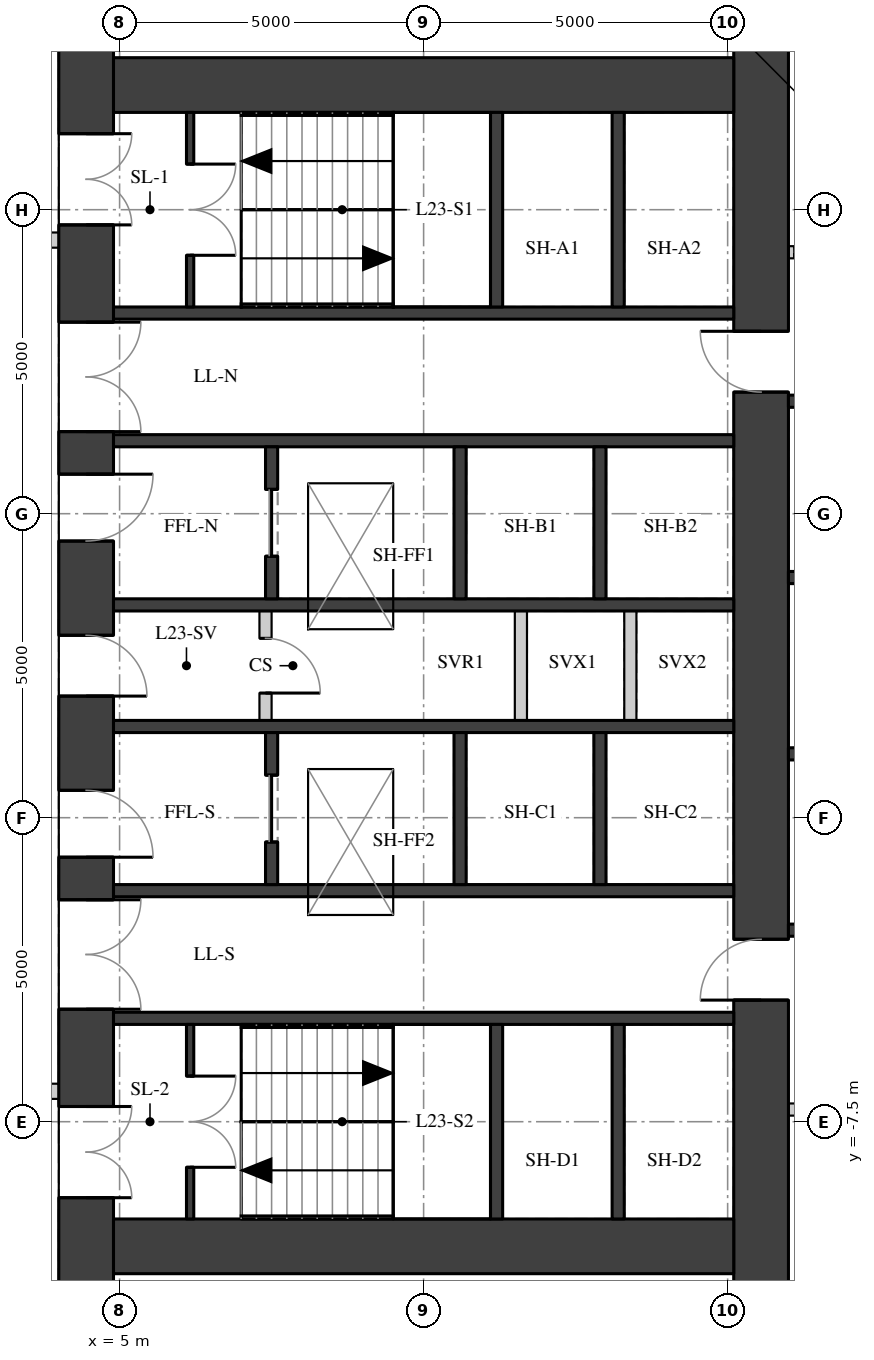
"""IFC4 building model, lengths in metres.
Left out: names, types, materials, properties, quantities, classifications, styles, units other than length and angle.
Written with IfcOpenShell. Run it as: python <this file> out.ifc"""

import sys

from ifc_helpers import new_model, si_unit, direction, frame, frame_2d, origin, place, context, subcontext, project, spatial, rectangle, extrude, element, fill, save


model = new_model("IFC4")
c1 = context("Model", 3, precision=1e-05, world=origin(), true_north=direction((0.0, 1.0)))
c2 = subcontext(c1, "Body", "Model", "MODEL_VIEW")
j1 = project(units=[si_unit("LENGTHUNIT", "METRE"), si_unit("PLANEANGLEUNIT", "RADIAN")], contexts=[c1])
p1 = place(None, origin())
s1 = spatial("IfcSite", under=j1, at=p1, CompositionType="ELEMENT")
p2 = place(p1, origin())
s2 = spatial("IfcBuilding", under=s1, at=p2, CompositionType="ELEMENT")
p3 = place(p2, frame((0.0, 0.0, 84.4)))
s3 = spatial("IfcBuildingStorey", under=s2, at=p3, CompositionType="ELEMENT", Elevation=84.4)
p4 = place(p3, frame((4.45, -11.1, 0.0), z_axis=(0.0, 0.0, 1.0), x_axis=(0.0, 1.0, 0.0)))
e1 = element("IfcWall", 1, at=p4, inside=s3, PredefinedType="SHEAR", context=c2, shape_type="SweptSolid", body=[
    extrude(rectangle(XDim=22.2, YDim=0.9, at=frame_2d((11.1, 0.0))), origin(), (0.0, 0.0, 1.0), 4.22),
])
p5 = place(p4, frame((2.35, 0.0, 0.0)))
e2 = element("IfcOpeningElement", 2, at=p5, cuts=e1, PredefinedType="OPENING", context=c2, shape_type="SweptSolid", body=[
    extrude(rectangle(XDim=1.5, YDim=2.1, at=frame_2d((0.75, 1.05))), frame((0.0, 0.46, 0.0), z_axis=(0.0, -1.0, 0.0), x_axis=(1.0, 0.0, 0.0)), (0.0, 0.0, 1.0), 0.92),
])
p6 = place(p4, frame((5.45, 0.0, 0.0)))
e3 = element("IfcOpeningElement", 3, at=p6, cuts=e1, PredefinedType="OPENING", context=c2, shape_type="SweptSolid", body=[
    extrude(rectangle(XDim=1.8, YDim=2.1, at=frame_2d((0.9, 1.05))), frame((0.0, 0.46, 0.0), z_axis=(0.0, -1.0, 0.0), x_axis=(1.0, 0.0, 0.0)), (0.0, 0.0, 1.0), 0.92),
])
p7 = place(p4, frame((7.95, 0.0, 0.0)))
e4 = element("IfcOpeningElement", 4, at=p7, cuts=e1, PredefinedType="OPENING", context=c2, shape_type="SweptSolid", body=[
    extrude(rectangle(XDim=1.1, YDim=2.1, at=frame_2d((0.55, 1.05))), frame((0.0, 0.46, 0.0), z_axis=(0.0, -1.0, 0.0), x_axis=(1.0, 0.0, 0.0)), (0.0, 0.0, 1.0), 0.92),
])
p8 = place(p4, frame((10.6, 0.0, 0.0)))
e5 = element("IfcOpeningElement", 5, at=p8, cuts=e1, PredefinedType="OPENING", context=c2, shape_type="SweptSolid", body=[
    extrude(rectangle(XDim=1.0, YDim=2.1, at=frame_2d((0.5, 1.05))), frame((0.0, 0.46, 0.0), z_axis=(0.0, -1.0, 0.0), x_axis=(1.0, 0.0, 0.0)), (0.0, 0.0, 1.0), 0.92),
])
p9 = place(p4, frame((13.15, 0.0, 0.0)))
e6 = element("IfcOpeningElement", 6, at=p9, cuts=e1, PredefinedType="OPENING", context=c2, shape_type="SweptSolid", body=[
    extrude(rectangle(XDim=1.1, YDim=2.1, at=frame_2d((0.55, 1.05))), frame((0.0, 0.46, 0.0), z_axis=(0.0, -1.0, 0.0), x_axis=(1.0, 0.0, 0.0)), (0.0, 0.0, 1.0), 0.92),
])
p10 = place(p4, frame((14.95, 0.0, 0.0)))
e7 = element("IfcOpeningElement", 7, at=p10, cuts=e1, PredefinedType="OPENING", context=c2, shape_type="SweptSolid", body=[
    extrude(rectangle(XDim=1.8, YDim=2.1, at=frame_2d((0.9, 1.05))), frame((0.0, 0.46, 0.0), z_axis=(0.0, -1.0, 0.0), x_axis=(1.0, 0.0, 0.0)), (0.0, 0.0, 1.0), 0.92),
])
p11 = place(p4, frame((18.35, 0.0, 0.0)))
e8 = element("IfcOpeningElement", 8, at=p11, cuts=e1, PredefinedType="OPENING", context=c2, shape_type="SweptSolid", body=[
    extrude(rectangle(XDim=1.5, YDim=2.1, at=frame_2d((0.75, 1.05))), frame((0.0, 0.46, 0.0), z_axis=(0.0, -1.0, 0.0), x_axis=(1.0, 0.0, 0.0)), (0.0, 0.0, 1.0), 0.92),
])
p12 = place(p3, frame((15.55, -11.1, 0.0), z_axis=(0.0, 0.0, 1.0), x_axis=(0.0, 1.0, 0.0)))
e9 = element("IfcWall", 9, at=p12, inside=s3, PredefinedType="SHEAR", context=c2, shape_type="SweptSolid", body=[
    extrude(rectangle(XDim=22.2, YDim=0.9, at=frame_2d((11.1, 0.0))), origin(), (0.0, 0.0, 1.0), 4.22),
])
p13 = place(p12, frame((15.6, 0.0, 0.0)))
e10 = element("IfcOpeningElement", 10, at=p13, cuts=e9, PredefinedType="OPENING", context=c2, shape_type="SweptSolid", body=[
    extrude(rectangle(XDim=1.0, YDim=2.1, at=frame_2d((0.5, 1.05))), frame((0.0, 0.46, 0.0), z_axis=(0.0, -1.0, 0.0), x_axis=(1.0, 0.0, 0.0)), (0.0, 0.0, 1.0), 0.92),
])
p14 = place(p12, frame((5.6, 0.0, 0.0)))
e11 = element("IfcOpeningElement", 11, at=p14, cuts=e9, PredefinedType="OPENING", context=c2, shape_type="SweptSolid", body=[
    extrude(rectangle(XDim=1.0, YDim=2.1, at=frame_2d((0.5, 1.05))), frame((0.0, 0.46, 0.0), z_axis=(0.0, -1.0, 0.0), x_axis=(1.0, 0.0, 0.0)), (0.0, 0.0, 1.0), 0.92),
])
for number, where, z_axis, x_axis in (
    (12, (4.9, 9.55, 0.0), (0.0, 0.0, 1.0), (1.0, 0.0, 0.0)),
    (13, (4.9, -9.55, 0.0), (0.0, 0.0, 1.0), (1.0, 0.0, 0.0)),
):
    element("IfcWall", number, at=place(p3, frame(where, z_axis=z_axis, x_axis=x_axis)), inside=s3, PredefinedType="SHEAR", context=c2, shape_type="SweptSolid", body=[
        extrude(rectangle(XDim=10.2, YDim=0.9, at=frame_2d((5.1, 0.0))), origin(), (0.0, 0.0, 1.0), 4.22),
    ])
for number, where, z_axis, x_axis in (
    (14, (4.9, 5.8, 0.0), (0.0, 0.0, 1.0), (1.0, 0.0, 0.0)),
    (15, (4.9, 3.7, 0.0), (0.0, 0.0, 1.0), (1.0, 0.0, 0.0)),
    (16, (4.9, 1.0, 0.0), (0.0, 0.0, 1.0), (1.0, 0.0, 0.0)),
    (17, (4.9, -1.0, 0.0), (0.0, 0.0, 1.0), (1.0, 0.0, 0.0)),
    (18, (4.9, -3.7, 0.0), (0.0, 0.0, 1.0), (1.0, 0.0, 0.0)),
    (19, (4.9, -5.8, 0.0), (0.0, 0.0, 1.0), (1.0, 0.0, 0.0)),
):
    element("IfcWall", number, at=place(p3, frame(where, z_axis=z_axis, x_axis=x_axis)), inside=s3, PredefinedType="SHEAR", context=c2, shape_type="SweptSolid", body=[
        extrude(rectangle(XDim=10.2, YDim=0.2, at=frame_2d((5.1, 0.0))), origin(), (0.0, 0.0, 1.0), 4.22),
    ])
for number, where, z_axis, x_axis in (
    (20, (11.2, 5.9, 0.0), (0.0, 0.0, 1.0), (0.0, 1.0, 0.0)),
    (21, (11.2, -9.1, 0.0), (0.0, 0.0, 1.0), (0.0, 1.0, 0.0)),
    (22, (13.2, 5.9, 0.0), (0.0, 0.0, 1.0), (0.0, 1.0, 0.0)),
    (23, (13.2, -9.1, 0.0), (0.0, 0.0, 1.0), (0.0, 1.0, 0.0)),
):
    element("IfcWall", number, at=place(p3, frame(where, z_axis=z_axis, x_axis=x_axis)), inside=s3, PredefinedType="SHEAR", context=c2, shape_type="SweptSolid", body=[
        extrude(rectangle(XDim=3.2, YDim=0.2, at=frame_2d((1.6, 0.0))), origin(), (0.0, 0.0, 1.0), 4.22),
    ])
p15 = place(p3, frame((7.5, 1.1, 0.0), z_axis=(0.0, 0.0, 1.0), x_axis=(0.0, 1.0, 0.0)))
e24 = element("IfcWall", 24, at=p15, inside=s3, PredefinedType="SHEAR", context=c2, shape_type="SweptSolid", body=[
    extrude(rectangle(XDim=2.5, YDim=0.2, at=frame_2d((1.25, 0.0))), origin(), (0.0, 0.0, 1.0), 4.22),
])
p16 = place(p15, frame((0.7, 0.0, 0.0)))
e25 = element("IfcOpeningElement", 25, at=p16, cuts=e24, PredefinedType="OPENING", context=c2, shape_type="SweptSolid", body=[
    extrude(rectangle(XDim=1.1, YDim=2.1, at=frame_2d((0.55, 1.05))), frame((0.0, 0.11, 0.0), z_axis=(0.0, -1.0, 0.0), x_axis=(1.0, 0.0, 0.0)), (0.0, 0.0, 1.0), 0.22),
])
p17 = place(p3, frame((7.5, -3.6, 0.0), z_axis=(0.0, 0.0, 1.0), x_axis=(0.0, 1.0, 0.0)))
e26 = element("IfcWall", 26, at=p17, inside=s3, PredefinedType="SHEAR", context=c2, shape_type="SweptSolid", body=[
    extrude(rectangle(XDim=2.5, YDim=0.2, at=frame_2d((1.25, 0.0))), origin(), (0.0, 0.0, 1.0), 4.22),
])
p18 = place(p17, frame((0.7, 0.0, 0.0)))
e27 = element("IfcOpeningElement", 27, at=p18, cuts=e26, PredefinedType="OPENING", context=c2, shape_type="SweptSolid", body=[
    extrude(rectangle(XDim=1.1, YDim=2.1, at=frame_2d((0.55, 1.05))), frame((0.0, 0.11, 0.0), z_axis=(0.0, -1.0, 0.0), x_axis=(1.0, 0.0, 0.0)), (0.0, 0.0, 1.0), 0.22),
])
for number, where, z_axis, x_axis in (
    (28, (10.6, 1.1, 0.0), (0.0, 0.0, 1.0), (0.0, 1.0, 0.0)),
    (29, (10.6, -3.6, 0.0), (0.0, 0.0, 1.0), (0.0, 1.0, 0.0)),
    (30, (12.9, 1.1, 0.0), (0.0, 0.0, 1.0), (0.0, 1.0, 0.0)),
    (31, (12.9, -3.6, 0.0), (0.0, 0.0, 1.0), (0.0, 1.0, 0.0)),
):
    element("IfcWall", number, at=place(p3, frame(where, z_axis=z_axis, x_axis=x_axis)), inside=s3, PredefinedType="SHEAR", context=c2, shape_type="SweptSolid", body=[
        extrude(rectangle(XDim=2.5, YDim=0.2, at=frame_2d((1.25, 0.0))), origin(), (0.0, 0.0, 1.0), 4.22),
    ])
p19 = place(p3, frame((6.16, 5.9, 0.0), z_axis=(0.0, 0.0, 1.0), x_axis=(0.0, 1.0, 0.0)))
e32 = element("IfcWall", 32, at=p19, inside=s3, PredefinedType="SHEAR", context=c2, shape_type="SweptSolid", body=[
    extrude(rectangle(XDim=3.2, YDim=0.12, at=frame_2d((1.6, 0.0))), origin(), (0.0, 0.0, 1.0), 4.22),
])
p20 = place(p19, frame((0.85, 0.0, 0.0)))
e33 = element("IfcOpeningElement", 33, at=p20, cuts=e32, PredefinedType="OPENING", context=c2, shape_type="SweptSolid", body=[
    extrude(rectangle(XDim=1.5, YDim=2.1, at=frame_2d((0.75, 1.05))), frame((0.0, 0.07, 0.0), z_axis=(0.0, -1.0, 0.0), x_axis=(1.0, 0.0, 0.0)), (0.0, 0.0, 1.0), 0.14),
])
p21 = place(p3, frame((6.16, -9.1, 0.0), z_axis=(0.0, 0.0, 1.0), x_axis=(0.0, 1.0, 0.0)))
e34 = element("IfcWall", 34, at=p21, inside=s3, PredefinedType="SHEAR", context=c2, shape_type="SweptSolid", body=[
    extrude(rectangle(XDim=3.2, YDim=0.12, at=frame_2d((1.6, 0.0))), origin(), (0.0, 0.0, 1.0), 4.22),
])
p22 = place(p21, frame((0.85, 0.0, 0.0)))
e35 = element("IfcOpeningElement", 35, at=p22, cuts=e34, PredefinedType="OPENING", context=c2, shape_type="SweptSolid", body=[
    extrude(rectangle(XDim=1.5, YDim=2.1, at=frame_2d((0.75, 1.05))), frame((0.0, 0.07, 0.0), z_axis=(0.0, -1.0, 0.0), x_axis=(1.0, 0.0, 0.0)), (0.0, 0.0, 1.0), 0.14),
])
p23 = place(p3, frame((7.4, -0.9, 0.0), z_axis=(0.0, 0.0, 1.0), x_axis=(0.0, 1.0, 0.0)))
e36 = element("IfcWall", 36, at=p23, inside=s3, PredefinedType="PARTITIONING", context=c2, shape_type="SweptSolid", body=[
    extrude(rectangle(XDim=1.8, YDim=0.2, at=frame_2d((0.9, 0.0))), origin(), (0.0, 0.0, 1.0), 4.22),
])
p24 = place(p23, frame((0.45, 0.0, 0.0)))
e37 = element("IfcOpeningElement", 37, at=p24, cuts=e36, PredefinedType="OPENING", context=c2, shape_type="SweptSolid", body=[
    extrude(rectangle(XDim=0.9, YDim=2.1, at=frame_2d((0.45, 1.05))), frame((0.0, 0.11, 0.0), z_axis=(0.0, -1.0, 0.0), x_axis=(1.0, 0.0, 0.0)), (0.0, 0.0, 1.0), 0.22),
])
for number, where, z_axis, x_axis in (
    (38, (11.6, -0.9, 0.0), (0.0, 0.0, 1.0), (0.0, 1.0, 0.0)),
    (39, (13.4, -0.9, 0.0), (0.0, 0.0, 1.0), (0.0, 1.0, 0.0)),
):
    element("IfcWall", number, at=place(p3, frame(where, z_axis=z_axis, x_axis=x_axis)), inside=s3, PredefinedType="PARTITIONING", context=c2, shape_type="SweptSolid", body=[
        extrude(rectangle(XDim=1.8, YDim=0.2, at=frame_2d((0.9, 0.0))), origin(), (0.0, 0.0, 1.0), 4.22),
    ])
for number, where, z_axis, x_axis in (
    (40, (16.0, -4.35, 0.0), (0.0, 0.0, 1.0), (1.0, 0.0, 0.0)),
    (41, (16.0, -1.45, 0.0), (0.0, 0.0, 1.0), (1.0, 0.0, 0.0)),
    (42, (16.0, 1.45, 0.0), (0.0, 0.0, 1.0), (1.0, 0.0, 0.0)),
    (43, (16.0, 4.35, 0.0), (0.0, 0.0, 1.0), (1.0, 0.0, 0.0)),
):
    element("IfcWall", number, at=place(p3, frame(where, z_axis=z_axis, x_axis=x_axis)), inside=s3, PredefinedType="SHEAR", context=c2, shape_type="SweptSolid", body=[
        extrude(rectangle(XDim=2.3, YDim=0.2, at=frame_2d((1.15, 0.0))), origin(), (0.0, 0.0, 1.0), 4.22),
    ])
p25 = place(p3, frame((16.0, 6.8, 0.0), z_axis=(0.0, 0.0, 1.0), x_axis=(1.0, 0.0, 0.0)))
e44 = element("IfcWall", 44, at=p25, inside=s3, PredefinedType="PARTITIONING", context=c2, shape_type="SweptSolid", body=[
    extrude(rectangle(XDim=2.3, YDim=0.2, at=frame_2d((1.15, 0.0))), origin(), (0.0, 0.0, 1.0), 4.22),
])
p26 = place(p25, frame((0.1, 0.0, 0.0)))
e45 = element("IfcOpeningElement", 45, at=p26, cuts=e44, PredefinedType="OPENING", context=c2, shape_type="SweptSolid", body=[
    extrude(rectangle(XDim=0.9, YDim=2.1, at=frame_2d((0.45, 1.05))), frame((0.0, 0.11, 0.0), z_axis=(0.0, -1.0, 0.0), x_axis=(1.0, 0.0, 0.0)), (0.0, 0.0, 1.0), 0.22),
])
p27 = place(p3, frame((16.0, -7.3, 0.0), z_axis=(0.0, 0.0, 1.0), x_axis=(1.0, 0.0, 0.0)))
e46 = element("IfcWall", 46, at=p27, inside=s3, PredefinedType="PARTITIONING", context=c2, shape_type="SweptSolid", body=[
    extrude(rectangle(XDim=2.3, YDim=0.2, at=frame_2d((1.15, 0.0))), origin(), (0.0, 0.0, 1.0), 4.22),
])
p28 = place(p27, frame((0.3, 0.0, 0.0)))
e47 = element("IfcOpeningElement", 47, at=p28, cuts=e46, PredefinedType="OPENING", context=c2, shape_type="SweptSolid", body=[
    extrude(rectangle(XDim=0.9, YDim=2.1, at=frame_2d((0.45, 1.05))), frame((0.0, 0.11, 0.0), z_axis=(0.0, -1.0, 0.0), x_axis=(1.0, 0.0, 0.0)), (0.0, 0.0, 1.0), 0.22),
])
p29 = place(p3, frame((-3.025, -7.0, 0.0), z_axis=(0.0, 0.0, 1.0), x_axis=(1.0, 0.0, 0.0)))
e48 = element("IfcWall", 48, at=p29, inside=s3, PredefinedType="PARTITIONING", context=c2, shape_type="SweptSolid", body=[
    extrude(rectangle(XDim=7.027, YDim=0.25, at=frame_2d((3.513, 0.0))), origin(), (0.0, 0.0, 1.0), 3.67),
])
p30 = place(p3, frame((-3.025, 7.0, 0.0), z_axis=(0.0, 0.0, 1.0), x_axis=(1.0, 0.0, 0.0)))
e49 = element("IfcWall", 49, at=p30, inside=s3, PredefinedType="PARTITIONING", context=c2, shape_type="SweptSolid", body=[
    extrude(rectangle(XDim=7.027, YDim=0.25, at=frame_2d((3.513, 0.0))), origin(), (0.0, 0.0, 1.0), 3.67),
])
p31 = place(p30, frame((3.013, 0.0, 0.0)))
e50 = element("IfcOpeningElement", 50, at=p31, cuts=e49, PredefinedType="OPENING", context=c2, shape_type="SweptSolid", body=[
    extrude(rectangle(XDim=1.0, YDim=2.1, at=frame_2d((0.5, 1.05))), frame((0.0, 0.135, 0.0), z_axis=(0.0, -1.0, 0.0), x_axis=(1.0, 0.0, 0.0)), (0.0, 0.0, 1.0), 0.27),
])
p32 = place(p5, origin())
e51 = element("IfcDoor", 51, at=p32, inside=s3, OperationType="DOUBLE_DOOR_SINGLE_SWING", PredefinedType="DOOR", context=c2, shape_type="SweptSolid", body=[
    extrude(rectangle(XDim=1.5, YDim=2.1, at=frame_2d((0.75, 1.05))), frame((0.0, 0.025, 0.0), z_axis=(0.0, -1.0, 0.0), x_axis=(1.0, 0.0, 0.0)), (0.0, 0.0, 1.0), 0.05),
])
fill(e2, e51)
p33 = place(p6, origin())
e52 = element("IfcDoor", 52, at=p33, inside=s3, OperationType="DOUBLE_DOOR_SINGLE_SWING", PredefinedType="DOOR", context=c2, shape_type="SweptSolid", body=[
    extrude(rectangle(XDim=1.8, YDim=2.1, at=frame_2d((0.9, 1.05))), frame((0.0, 0.025, 0.0), z_axis=(0.0, -1.0, 0.0), x_axis=(1.0, 0.0, 0.0)), (0.0, 0.0, 1.0), 0.05),
])
fill(e3, e52)
p34 = place(p7, origin())
e53 = element("IfcDoor", 53, at=p34, inside=s3, OperationType="SINGLE_SWING_RIGHT", PredefinedType="DOOR", context=c2, shape_type="SweptSolid", body=[
    extrude(rectangle(XDim=1.1, YDim=2.1, at=frame_2d((0.55, 1.05))), frame((0.0, 0.025, 0.0), z_axis=(0.0, -1.0, 0.0), x_axis=(1.0, 0.0, 0.0)), (0.0, 0.0, 1.0), 0.05),
])
fill(e4, e53)
p35 = place(p8, origin())
e54 = element("IfcDoor", 54, at=p35, inside=s3, OperationType="SINGLE_SWING_RIGHT", PredefinedType="DOOR", context=c2, shape_type="SweptSolid", body=[
    extrude(rectangle(XDim=1.0, YDim=2.1, at=frame_2d((0.5, 1.05))), frame((0.0, 0.025, 0.0), z_axis=(0.0, -1.0, 0.0), x_axis=(1.0, 0.0, 0.0)), (0.0, 0.0, 1.0), 0.05),
])
fill(e5, e54)
p36 = place(p9, origin())
e55 = element("IfcDoor", 55, at=p36, inside=s3, OperationType="SINGLE_SWING_LEFT", PredefinedType="DOOR", context=c2, shape_type="SweptSolid", body=[
    extrude(rectangle(XDim=1.1, YDim=2.1, at=frame_2d((0.55, 1.05))), frame((0.0, 0.025, 0.0), z_axis=(0.0, -1.0, 0.0), x_axis=(1.0, 0.0, 0.0)), (0.0, 0.0, 1.0), 0.05),
])
fill(e6, e55)
p37 = place(p10, origin())
e56 = element("IfcDoor", 56, at=p37, inside=s3, OperationType="DOUBLE_DOOR_SINGLE_SWING", PredefinedType="DOOR", context=c2, shape_type="SweptSolid", body=[
    extrude(rectangle(XDim=1.8, YDim=2.1, at=frame_2d((0.9, 1.05))), frame((0.0, 0.025, 0.0), z_axis=(0.0, -1.0, 0.0), x_axis=(1.0, 0.0, 0.0)), (0.0, 0.0, 1.0), 0.05),
])
fill(e7, e56)
p38 = place(p11, origin())
e57 = element("IfcDoor", 57, at=p38, inside=s3, OperationType="DOUBLE_DOOR_SINGLE_SWING", PredefinedType="DOOR", context=c2, shape_type="SweptSolid", body=[
    extrude(rectangle(XDim=1.5, YDim=2.1, at=frame_2d((0.75, 1.05))), frame((0.0, 0.025, 0.0), z_axis=(0.0, -1.0, 0.0), x_axis=(1.0, 0.0, 0.0)), (0.0, 0.0, 1.0), 0.05),
])
fill(e8, e57)
p39 = place(p20, origin())
e58 = element("IfcDoor", 58, at=p39, inside=s3, OperationType="DOUBLE_DOOR_SINGLE_SWING", PredefinedType="DOOR", context=c2, shape_type="SweptSolid", body=[
    extrude(rectangle(XDim=1.5, YDim=2.1, at=frame_2d((0.75, 1.05))), frame((0.0, 0.025, 0.0), z_axis=(0.0, -1.0, 0.0), x_axis=(1.0, 0.0, 0.0)), (0.0, 0.0, 1.0), 0.05),
])
fill(e33, e58)
p40 = place(p22, origin())
e59 = element("IfcDoor", 59, at=p40, inside=s3, OperationType="DOUBLE_DOOR_SINGLE_SWING", PredefinedType="DOOR", context=c2, shape_type="SweptSolid", body=[
    extrude(rectangle(XDim=1.5, YDim=2.1, at=frame_2d((0.75, 1.05))), frame((0.0, 0.025, 0.0), z_axis=(0.0, -1.0, 0.0), x_axis=(1.0, 0.0, 0.0)), (0.0, 0.0, 1.0), 0.05),
])
fill(e35, e59)
p41 = place(p16, origin())
e60 = element("IfcDoor", 60, at=p41, inside=s3, OperationType="DOUBLE_DOOR_SLIDING", PredefinedType="DOOR", context=c2, shape_type="SweptSolid", body=[
    extrude(rectangle(XDim=1.1, YDim=2.1, at=frame_2d((0.55, 1.05))), frame((0.0, 0.025, 0.0), z_axis=(0.0, -1.0, 0.0), x_axis=(1.0, 0.0, 0.0)), (0.0, 0.0, 1.0), 0.05),
])
fill(e25, e60)
p42 = place(p18, origin())
e61 = element("IfcDoor", 61, at=p42, inside=s3, OperationType="DOUBLE_DOOR_SLIDING", PredefinedType="DOOR", context=c2, shape_type="SweptSolid", body=[
    extrude(rectangle(XDim=1.1, YDim=2.1, at=frame_2d((0.55, 1.05))), frame((0.0, 0.025, 0.0), z_axis=(0.0, -1.0, 0.0), x_axis=(1.0, 0.0, 0.0)), (0.0, 0.0, 1.0), 0.05),
])
fill(e27, e61)
p43 = place(p24, origin())
e62 = element("IfcDoor", 62, at=p43, inside=s3, OperationType="SINGLE_SWING_RIGHT", PredefinedType="DOOR", context=c2, shape_type="SweptSolid", body=[
    extrude(rectangle(XDim=0.9, YDim=2.1, at=frame_2d((0.45, 1.05))), frame((0.0, 0.025, 0.0), z_axis=(0.0, -1.0, 0.0), x_axis=(1.0, 0.0, 0.0)), (0.0, 0.0, 1.0), 0.05),
])
fill(e37, e62)
p44 = place(p13, origin())
e63 = element("IfcDoor", 63, at=p44, inside=s3, OperationType="SINGLE_SWING_RIGHT", PredefinedType="DOOR", context=c2, shape_type="SweptSolid", body=[
    extrude(rectangle(XDim=1.0, YDim=2.1, at=frame_2d((0.5, 1.05))), frame((0.0, 0.025, 0.0), z_axis=(0.0, -1.0, 0.0), x_axis=(1.0, 0.0, 0.0)), (0.0, 0.0, 1.0), 0.05),
])
fill(e10, e63)
p45 = place(p14, origin())
e64 = element("IfcDoor", 64, at=p45, inside=s3, OperationType="SINGLE_SWING_LEFT", PredefinedType="DOOR", context=c2, shape_type="SweptSolid", body=[
    extrude(rectangle(XDim=1.0, YDim=2.1, at=frame_2d((0.5, 1.05))), frame((0.0, 0.025, 0.0), z_axis=(0.0, -1.0, 0.0), x_axis=(1.0, 0.0, 0.0)), (0.0, 0.0, 1.0), 0.05),
])
fill(e11, e64)
save(model, sys.argv[1])
